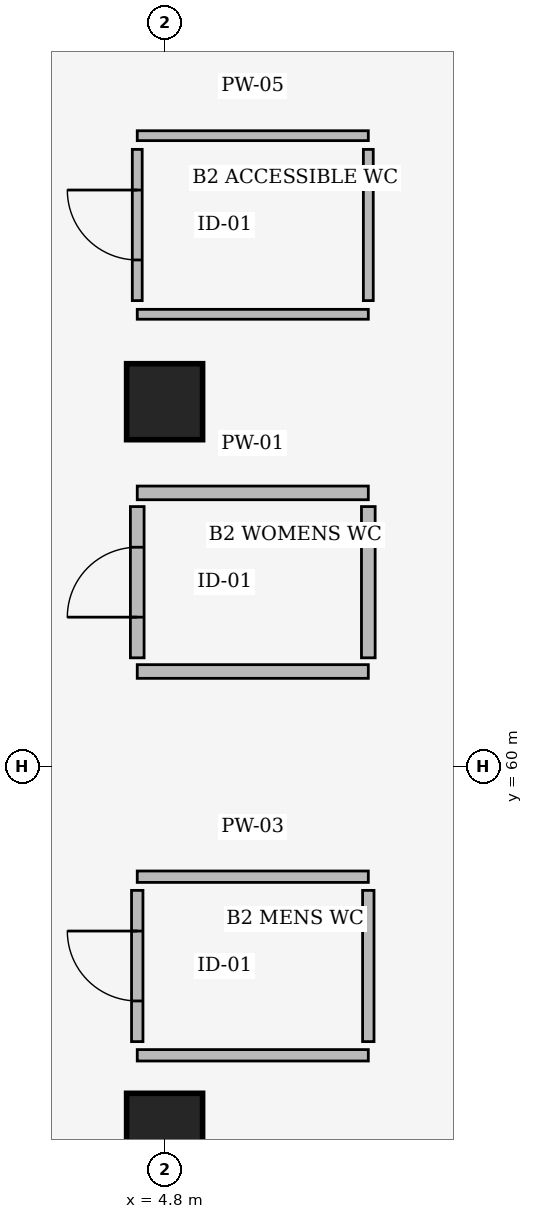
"""IFC4 building model, lengths in metres.
Left out: names, types, materials, properties, quantities, classifications, styles, units other than length and angle.
Written with IfcOpenShell. Run it as: python <this file> out.ifc"""

import sys

from ifc_helpers import new_model, si_unit, direction, frame, frame_2d, origin, origin_2d, place, context, subcontext, project, spatial, rectangle, extrude, element, fill, save


model = new_model("IFC4")
c1 = context("Model", 3, precision=1e-05, world=origin(), true_north=direction((0.0, 1.0)))
c2 = subcontext(c1, "Body", "Model", "MODEL_VIEW")
j1 = project(units=[si_unit("LENGTHUNIT", "METRE"), si_unit("PLANEANGLEUNIT", "RADIAN")], contexts=[c1])
p1 = place(None, origin())
s1 = spatial("IfcSite", under=j1, at=p1, CompositionType="ELEMENT")
p2 = place(p1, origin())
s2 = spatial("IfcBuilding", under=s1, at=p2, CompositionType="ELEMENT")
p3 = place(p2, frame((0.0, 0.0, -9.6)))
s3 = spatial("IfcBuildingStorey", under=s2, at=p3, CompositionType="ELEMENT", Elevation=-9.6)
for number, where, z_axis, x_axis in (
    (1, (4.8, 55.2, 0.0), (0.0, 0.0, 1.0), (1.0, 0.0, 0.0)),
    (2, (4.8, 64.8, 0.0), (0.0, 0.0, 1.0), (1.0, 0.0, 0.0)),
):
    element("IfcColumn", number, at=place(p3, frame(where, z_axis=z_axis, x_axis=x_axis)), inside=s3, PredefinedType="COLUMN", context=c2, shape_type="SweptSolid", body=[
        extrude(rectangle(XDim=1.0, YDim=1.0, at=origin_2d()), origin(), (0.0, 0.0, 1.0), 4.8),
    ])
for number, where, z_axis, x_axis in (
    (3, (4.44, 58.55, 0.0), (0.0, 0.0, 1.0), (1.0, 0.0, 0.0)),
    (4, (4.44, 56.2, 0.0), (0.0, 0.0, 1.0), (1.0, 0.0, 0.0)),
):
    element("IfcWall", number, at=place(p3, frame(where, z_axis=z_axis, x_axis=x_axis)), inside=s3, PredefinedType="PARTITIONING", context=c2, shape_type="SweptSolid", body=[
        extrude(rectangle(XDim=3.04, YDim=0.15, at=frame_2d((1.52, 0.0))), origin(), (0.0, 0.0, 1.0), 3.466),
    ])
p4 = place(p3, frame((4.44, 56.38, 0.0), z_axis=(0.0, 0.0, 1.0), x_axis=(0.0, 1.0, 0.0)))
e5 = element("IfcWall", 5, at=p4, inside=s3, PredefinedType="PARTITIONING", context=c2, shape_type="SweptSolid", body=[
    extrude(rectangle(XDim=1.99, YDim=0.15, at=frame_2d((0.995, 0.0))), origin(), (0.0, 0.0, 1.0), 3.466),
])
p5 = place(p4, frame((0.535, 0.0, 0.0)))
e6 = element("IfcOpeningElement", 6, at=p5, cuts=e5, PredefinedType="OPENING", context=c2, shape_type="SweptSolid", body=[
    extrude(rectangle(XDim=0.92, YDim=2.12, at=frame_2d((0.46, 1.06))), frame((0.0, 0.085, 0.0), z_axis=(0.0, -1.0, 0.0), x_axis=(1.0, 0.0, 0.0)), (0.0, 0.0, 1.0), 0.17),
])
p6 = place(p3, frame((7.48, 56.38, 0.0), z_axis=(0.0, 0.0, 1.0), x_axis=(0.0, 1.0, 0.0)))
e7 = element("IfcWall", 7, at=p6, inside=s3, PredefinedType="PARTITIONING", context=c2, shape_type="SweptSolid", body=[
    extrude(rectangle(XDim=1.99, YDim=0.15, at=frame_2d((0.995, 0.0))), origin(), (0.0, 0.0, 1.0), 4.44),
])
for number, where, z_axis, x_axis in (
    (8, (4.44, 63.6, 0.0), (0.0, 0.0, 1.0), (1.0, 0.0, 0.0)),
    (9, (4.44, 61.25, 0.0), (0.0, 0.0, 1.0), (1.0, 0.0, 0.0)),
):
    element("IfcWall", number, at=place(p3, frame(where, z_axis=z_axis, x_axis=x_axis)), inside=s3, PredefinedType="PARTITIONING", context=c2, shape_type="SweptSolid", body=[
        extrude(rectangle(XDim=3.04, YDim=0.18, at=frame_2d((1.52, 0.0))), origin(), (0.0, 0.0, 1.0), 3.466),
    ])
p7 = place(p3, frame((4.44, 61.43, 0.0), z_axis=(0.0, 0.0, 1.0), x_axis=(0.0, 1.0, 0.0)))
e10 = element("IfcWall", 10, at=p7, inside=s3, PredefinedType="PARTITIONING", context=c2, shape_type="SweptSolid", body=[
    extrude(rectangle(XDim=1.99, YDim=0.18, at=frame_2d((0.995, 0.0))), origin(), (0.0, 0.0, 1.0), 3.466),
])
p8 = place(p7, frame((0.535, 0.0, 0.0)))
e11 = element("IfcOpeningElement", 11, at=p8, cuts=e10, PredefinedType="OPENING", context=c2, shape_type="SweptSolid", body=[
    extrude(rectangle(XDim=0.92, YDim=2.12, at=frame_2d((0.46, 1.06))), frame((0.0, 0.1, 0.0), z_axis=(0.0, -1.0, 0.0), x_axis=(1.0, 0.0, 0.0)), (0.0, 0.0, 1.0), 0.2),
])
p9 = place(p3, frame((7.48, 61.43, 0.0), z_axis=(0.0, 0.0, 1.0), x_axis=(0.0, 1.0, 0.0)))
e12 = element("IfcWall", 12, at=p9, inside=s3, PredefinedType="PARTITIONING", context=c2, shape_type="SweptSolid", body=[
    extrude(rectangle(XDim=1.99, YDim=0.18, at=frame_2d((0.995, 0.0))), origin(), (0.0, 0.0, 1.0), 4.44),
])
for number, where, z_axis, x_axis in (
    (13, (4.44, 68.3, 0.0), (0.0, 0.0, 1.0), (1.0, 0.0, 0.0)),
    (14, (4.44, 65.95, 0.0), (0.0, 0.0, 1.0), (1.0, 0.0, 0.0)),
):
    element("IfcWall", number, at=place(p3, frame(where, z_axis=z_axis, x_axis=x_axis)), inside=s3, PredefinedType="PARTITIONING", context=c2, shape_type="SweptSolid", body=[
        extrude(rectangle(XDim=3.04, YDim=0.13, at=frame_2d((1.52, 0.0))), origin(), (0.0, 0.0, 1.0), 3.166),
    ])
p10 = place(p3, frame((4.44, 66.13, 0.0), z_axis=(0.0, 0.0, 1.0), x_axis=(0.0, 1.0, 0.0)))
e15 = element("IfcWall", 15, at=p10, inside=s3, PredefinedType="PARTITIONING", context=c2, shape_type="SweptSolid", body=[
    extrude(rectangle(XDim=1.99, YDim=0.13, at=frame_2d((0.995, 0.0))), origin(), (0.0, 0.0, 1.0), 3.166),
])
p11 = place(p10, frame((0.535, 0.0, 0.0)))
e16 = element("IfcOpeningElement", 16, at=p11, cuts=e15, PredefinedType="OPENING", context=c2, shape_type="SweptSolid", body=[
    extrude(rectangle(XDim=0.92, YDim=2.12, at=frame_2d((0.46, 1.06))), frame((0.0, 0.075, 0.0), z_axis=(0.0, -1.0, 0.0), x_axis=(1.0, 0.0, 0.0)), (0.0, 0.0, 1.0), 0.15),
])
p12 = place(p3, frame((7.48, 66.13, 0.0), z_axis=(0.0, 0.0, 1.0), x_axis=(0.0, 1.0, 0.0)))
e17 = element("IfcWall", 17, at=p12, inside=s3, PredefinedType="PARTITIONING", context=c2, shape_type="SweptSolid", body=[
    extrude(rectangle(XDim=1.99, YDim=0.13, at=frame_2d((0.995, 0.0))), origin(), (0.0, 0.0, 1.0), 4.44),
])
p13 = place(p5, origin())
e18 = element("IfcDoor", 18, at=p13, inside=s3, OperationType="SINGLE_SWING_RIGHT", PredefinedType="DOOR", context=c2, shape_type="SweptSolid", body=[
    extrude(rectangle(XDim=0.92, YDim=2.12, at=frame_2d((0.46, 1.06))), frame((0.0, 0.025, 0.0), z_axis=(0.0, -1.0, 0.0), x_axis=(1.0, 0.0, 0.0)), (0.0, 0.0, 1.0), 0.05),
])
fill(e6, e18)
p14 = place(p8, origin())
e19 = element("IfcDoor", 19, at=p14, inside=s3, OperationType="SINGLE_SWING_LEFT", PredefinedType="DOOR", context=c2, shape_type="SweptSolid", body=[
    extrude(rectangle(XDim=0.92, YDim=2.12, at=frame_2d((0.46, 1.06))), frame((0.0, 0.025, 0.0), z_axis=(0.0, -1.0, 0.0), x_axis=(1.0, 0.0, 0.0)), (0.0, 0.0, 1.0), 0.05),
])
fill(e11, e19)
p15 = place(p11, origin())
e20 = element("IfcDoor", 20, at=p15, inside=s3, OperationType="SINGLE_SWING_RIGHT", PredefinedType="DOOR", context=c2, shape_type="SweptSolid", body=[
    extrude(rectangle(XDim=0.92, YDim=2.12, at=frame_2d((0.46, 1.06))), frame((0.0, 0.025, 0.0), z_axis=(0.0, -1.0, 0.0), x_axis=(1.0, 0.0, 0.0)), (0.0, 0.0, 1.0), 0.05),
])
fill(e16, e20)
save(model, sys.argv[1])
